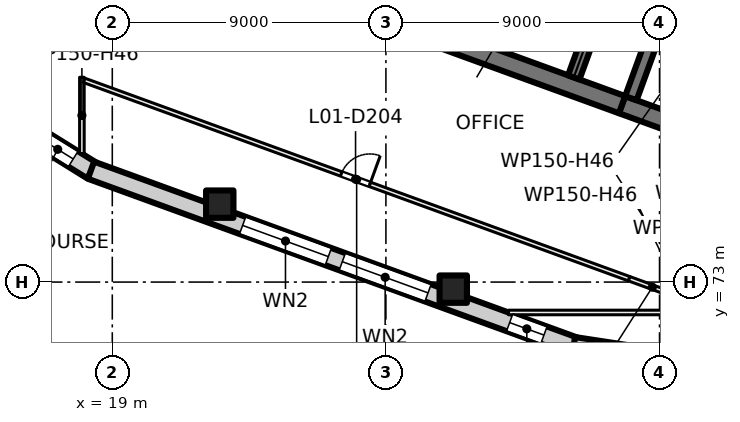
"""IFC4 building model, lengths in metres.
Left out: names, types, materials, properties, quantities, classifications, styles, units other than length and angle.
Written with IfcOpenShell. Run it as: python <this file> out.ifc"""

import sys

from ifc_helpers import new_model, si_unit, direction, frame, frame_2d, origin, origin_2d, place, context, subcontext, project, spatial, rectangle, extrude, element, fill, save


model = new_model("IFC4")
c1 = context("Model", 3, precision=1e-05, world=origin(), true_north=direction((0.0, 1.0)))
c2 = subcontext(c1, "Body", "Model", "MODEL_VIEW")
j1 = project(units=[si_unit("LENGTHUNIT", "METRE"), si_unit("PLANEANGLEUNIT", "RADIAN")], contexts=[c1])
p1 = place(None, origin())
s1 = spatial("IfcSite", under=j1, at=p1, CompositionType="ELEMENT")
p2 = place(p1, origin())
s2 = spatial("IfcBuilding", under=s1, at=p2, CompositionType="ELEMENT")
p3 = place(p2, frame((0.0, 0.0, 7.5)))
s3 = spatial("IfcBuildingStorey", under=s2, at=p3, CompositionType="ELEMENT", Elevation=7.5)
for number, where, z_axis, x_axis in (
    (1, (30.215, 72.768, 0.0), (0.0, 0.0, 1.0), (1.0, 0.0, 0.0)),
    (2, (22.535, 75.563, 0.0), (0.0, 0.0, 1.0), (1.0, 0.0, 0.0)),
):
    element("IfcColumn", number, at=place(p3, frame(where, z_axis=z_axis, x_axis=x_axis)), inside=s3, PredefinedType="COLUMN", context=c2, shape_type="SweptSolid", body=[
        extrude(rectangle(XDim=0.9, YDim=0.9, at=origin_2d()), origin(), (0.0, 0.0, 1.0), 5.0),
    ])
p4 = place(p3, frame((39.338, 77.535, 0.0), z_axis=(0.0, 0.0, 1.0), x_axis=(-0.939701471648, 0.341995824804, 0.0)))
e3 = element("IfcWall", 3, at=p4, inside=s3, PredefinedType="SHEAR", context=c2, shape_type="SweptSolid", body=[
    extrude(rectangle(XDim=3.8, YDim=0.6, at=frame_2d((1.9, 0.0))), origin(), (0.0, 0.0, 1.0), 5.0),
])
p5 = place(p3, frame((35.767, 78.835, 0.0), z_axis=(0.0, 0.0, 1.0), x_axis=(-0.939692894512, 0.342019391267, 0.0)))
e4 = element("IfcWall", 4, at=p5, inside=s3, PredefinedType="SHEAR", context=c2, shape_type="SweptSolid", body=[
    extrude(rectangle(XDim=14.4, YDim=0.6, at=frame_2d((7.2, 0.0))), origin(), (0.0, 0.0, 1.0), 5.0),
])
p6 = place(p3, frame((36.058, 79.048, 0.0), z_axis=(0.0, 0.0, 1.0), x_axis=(0.342016982193, 0.939693771338, 0.0)))
e5 = element("IfcWall", 5, at=p6, inside=s3, PredefinedType="SHEAR", context=c2, shape_type="SweptSolid", body=[
    extrude(rectangle(XDim=7.8, YDim=0.4, at=frame_2d((3.9, 0.0))), origin(), (0.0, 0.0, 1.0), 5.0),
])
p7 = place(p3, frame((34.178, 79.732, 0.0), z_axis=(0.0, 0.0, 1.0), x_axis=(0.342014590177, 0.939694641948, 0.0)))
e6 = element("IfcWall", 6, at=p7, inside=s3, PredefinedType="SHEAR", context=c2, shape_type="SweptSolid", body=[
    extrude(rectangle(XDim=12.2, YDim=0.4, at=frame_2d((6.1, 0.0))), origin(), (0.0, 0.0, 1.0), 5.0),
])
p8 = place(p3, frame((18.329, 76.668, 0.0), z_axis=(0.0, 0.0, 1.0), x_axis=(-0.849679171995, 0.527300013918, 0.0)))
e7 = element("IfcWall", 7, at=p8, inside=s3, PredefinedType="SOLIDWALL", context=c2, shape_type="SweptSolid", body=[
    extrude(rectangle(XDim=4.062, YDim=0.6, at=frame_2d((2.031, 0.0))), origin(), (0.0, 0.0, 1.0), 4.6),
])
p9 = place(p8, frame((0.723, 0.0, 0.9)))
e8 = element("IfcOpeningElement", 8, at=p9, cuts=e7, PredefinedType="OPENING", context=c2, shape_type="SweptSolid", body=[
    extrude(rectangle(XDim=1.2, YDim=3.0, at=frame_2d((0.6, 1.5))), frame((0.0, 0.31, 0.0), z_axis=(0.0, -1.0, 0.0), x_axis=(1.0, 0.0, 0.0)), (0.0, 0.0, 1.0), 0.62),
])
p10 = place(p3, frame((34.204, 70.89, 0.0), z_axis=(0.0, 0.0, 1.0), x_axis=(-0.939693996621, 0.342016363227, 0.0)))
e9 = element("IfcWall", 9, at=p10, inside=s3, PredefinedType="SOLIDWALL", context=c2, shape_type="SweptSolid", body=[
    extrude(rectangle(XDim=16.926, YDim=0.6, at=frame_2d((8.463, 0.0))), origin(), (0.0, 0.0, 1.0), 4.6),
])
p11 = place(p10, frame((1.071, 0.0, 0.9)))
e10 = element("IfcOpeningElement", 10, at=p11, cuts=e9, PredefinedType="OPENING", context=c2, shape_type="SweptSolid", body=[
    extrude(rectangle(XDim=1.2, YDim=3.0, at=frame_2d((0.6, 1.5))), frame((0.0, 0.31, 0.0), z_axis=(0.0, -1.0, 0.0), x_axis=(1.0, 0.0, 0.0)), (0.0, 0.0, 1.0), 0.62),
])
p12 = place(p10, frame((5.129, 0.0, 0.9)))
e11 = element("IfcOpeningElement", 11, at=p12, cuts=e9, PredefinedType="OPENING", context=c2, shape_type="SweptSolid", body=[
    extrude(rectangle(XDim=3.0, YDim=3.0, at=frame_2d((1.5, 1.5))), frame((0.0, 0.31, 0.0), z_axis=(0.0, -1.0, 0.0), x_axis=(1.0, 0.0, 0.0)), (0.0, 0.0, 1.0), 0.62),
])
p13 = place(p10, frame((8.618, 0.0, 0.9)))
e12 = element("IfcOpeningElement", 12, at=p13, cuts=e9, PredefinedType="OPENING", context=c2, shape_type="SweptSolid", body=[
    extrude(rectangle(XDim=3.0, YDim=3.0, at=frame_2d((1.5, 1.5))), frame((0.0, 0.31, 0.0), z_axis=(0.0, -1.0, 0.0), x_axis=(1.0, 0.0, 0.0)), (0.0, 0.0, 1.0), 0.62),
])
p14 = place(p3, frame((38.022, 70.308, 0.0), z_axis=(0.0, 0.0, 1.0), x_axis=(-0.98857030495, 0.150760578968, 0.0)))
e13 = element("IfcWall", 13, at=p14, inside=s3, PredefinedType="SOLIDWALL", context=c2, shape_type="SweptSolid", body=[
    extrude(rectangle(XDim=3.891, YDim=0.6, at=frame_2d((1.946, 0.0))), origin(), (0.0, 0.0, 1.0), 4.6),
])
p15 = place(p3, frame((18.0, 77.225, 0.0), z_axis=(0.0, 0.0, 1.0), x_axis=(0.0, 1.0, 0.0)))
e14 = element("IfcWall", 14, at=p15, inside=s3, PredefinedType="PARTITIONING", context=c2, shape_type="SweptSolid", body=[
    extrude(rectangle(XDim=2.511, YDim=0.15, at=frame_2d((1.255, 0.0))), origin(), (0.0, 0.0, 1.0), 4.6),
])
p16 = place(p3, frame((36.0, 73.11, 0.0), z_axis=(0.0, 0.0, 1.0), x_axis=(-0.939696975073, 0.342008179784, 0.0)))
e15 = element("IfcWall", 15, at=p16, inside=s3, PredefinedType="PARTITIONING", context=c2, shape_type="SweptSolid", body=[
    extrude(rectangle(XDim=19.075, YDim=0.15, at=frame_2d((9.538, 0.0))), origin(), (0.0, 0.0, 1.0), 4.6),
])
p17 = place(p16, frame((9.076, 0.0, 0.0)))
e16 = element("IfcOpeningElement", 16, at=p17, cuts=e15, PredefinedType="OPENING", context=c2, shape_type="SweptSolid", body=[
    extrude(rectangle(XDim=1.0, YDim=2.1, at=frame_2d((0.5, 1.05))), frame((0.0, 0.085, 0.0), z_axis=(0.0, -1.0, 0.0), x_axis=(1.0, 0.0, 0.0)), (0.0, 0.0, 1.0), 0.17),
])
p18 = place(p3, frame((32.032, 72.0, 0.0), z_axis=(0.0, 0.0, 1.0), x_axis=(1.0, 0.0, 0.0)))
e17 = element("IfcWall", 17, at=p18, inside=s3, PredefinedType="PARTITIONING", context=c2, shape_type="SweptSolid", body=[
    extrude(rectangle(XDim=11.903, YDim=0.15, at=frame_2d((5.952, 0.0))), origin(), (0.0, 0.0, 1.0), 4.6),
])
p19 = place(p3, frame((36.0, 73.11, 0.0), z_axis=(0.0, 0.0, 1.0), x_axis=(0.939696948785, -0.34200825201, 0.0)))
e18 = element("IfcWall", 18, at=p19, inside=s3, PredefinedType="PARTITIONING", context=c2, shape_type="SweptSolid", body=[
    extrude(rectangle(XDim=1.626, YDim=0.15, at=frame_2d((0.813, 0.0))), origin(), (0.0, 0.0, 1.0), 4.6),
])
p20 = place(p9, origin())
e19 = element("IfcWindow", 19, at=p20, inside=s3, PartitioningType="SINGLE_PANEL", PredefinedType="WINDOW", context=c2, shape_type="SweptSolid", body=[
    extrude(rectangle(XDim=1.2, YDim=3.0, at=frame_2d((0.6, 1.5))), frame((0.0, 0.03, 0.0), z_axis=(0.0, -1.0, 0.0), x_axis=(1.0, 0.0, 0.0)), (0.0, 0.0, 1.0), 0.06),
])
fill(e8, e19)
p21 = place(p11, origin())
e20 = element("IfcWindow", 20, at=p21, inside=s3, PartitioningType="SINGLE_PANEL", PredefinedType="WINDOW", context=c2, shape_type="SweptSolid", body=[
    extrude(rectangle(XDim=1.2, YDim=3.0, at=frame_2d((0.6, 1.5))), frame((0.0, 0.03, 0.0), z_axis=(0.0, -1.0, 0.0), x_axis=(1.0, 0.0, 0.0)), (0.0, 0.0, 1.0), 0.06),
])
fill(e10, e20)
p22 = place(p12, origin())
e21 = element("IfcWindow", 21, at=p22, inside=s3, PartitioningType="SINGLE_PANEL", PredefinedType="WINDOW", context=c2, shape_type="SweptSolid", body=[
    extrude(rectangle(XDim=3.0, YDim=3.0, at=frame_2d((1.5, 1.5))), frame((0.0, 0.03, 0.0), z_axis=(0.0, -1.0, 0.0), x_axis=(1.0, 0.0, 0.0)), (0.0, 0.0, 1.0), 0.06),
])
fill(e11, e21)
p23 = place(p13, origin())
e22 = element("IfcWindow", 22, at=p23, inside=s3, PartitioningType="SINGLE_PANEL", PredefinedType="WINDOW", context=c2, shape_type="SweptSolid", body=[
    extrude(rectangle(XDim=3.0, YDim=3.0, at=frame_2d((1.5, 1.5))), frame((0.0, 0.03, 0.0), z_axis=(0.0, -1.0, 0.0), x_axis=(1.0, 0.0, 0.0)), (0.0, 0.0, 1.0), 0.06),
])
fill(e12, e22)
p24 = place(p17, origin())
e23 = element("IfcDoor", 23, at=p24, inside=s3, OperationType="SINGLE_SWING_LEFT", PredefinedType="DOOR", context=c2, shape_type="SweptSolid", body=[
    extrude(rectangle(XDim=1.0, YDim=2.1, at=frame_2d((0.5, 1.05))), frame((0.0, 0.025, 0.0), z_axis=(0.0, -1.0, 0.0), x_axis=(1.0, 0.0, 0.0)), (0.0, 0.0, 1.0), 0.05),
])
fill(e16, e23)
save(model, sys.argv[1])
